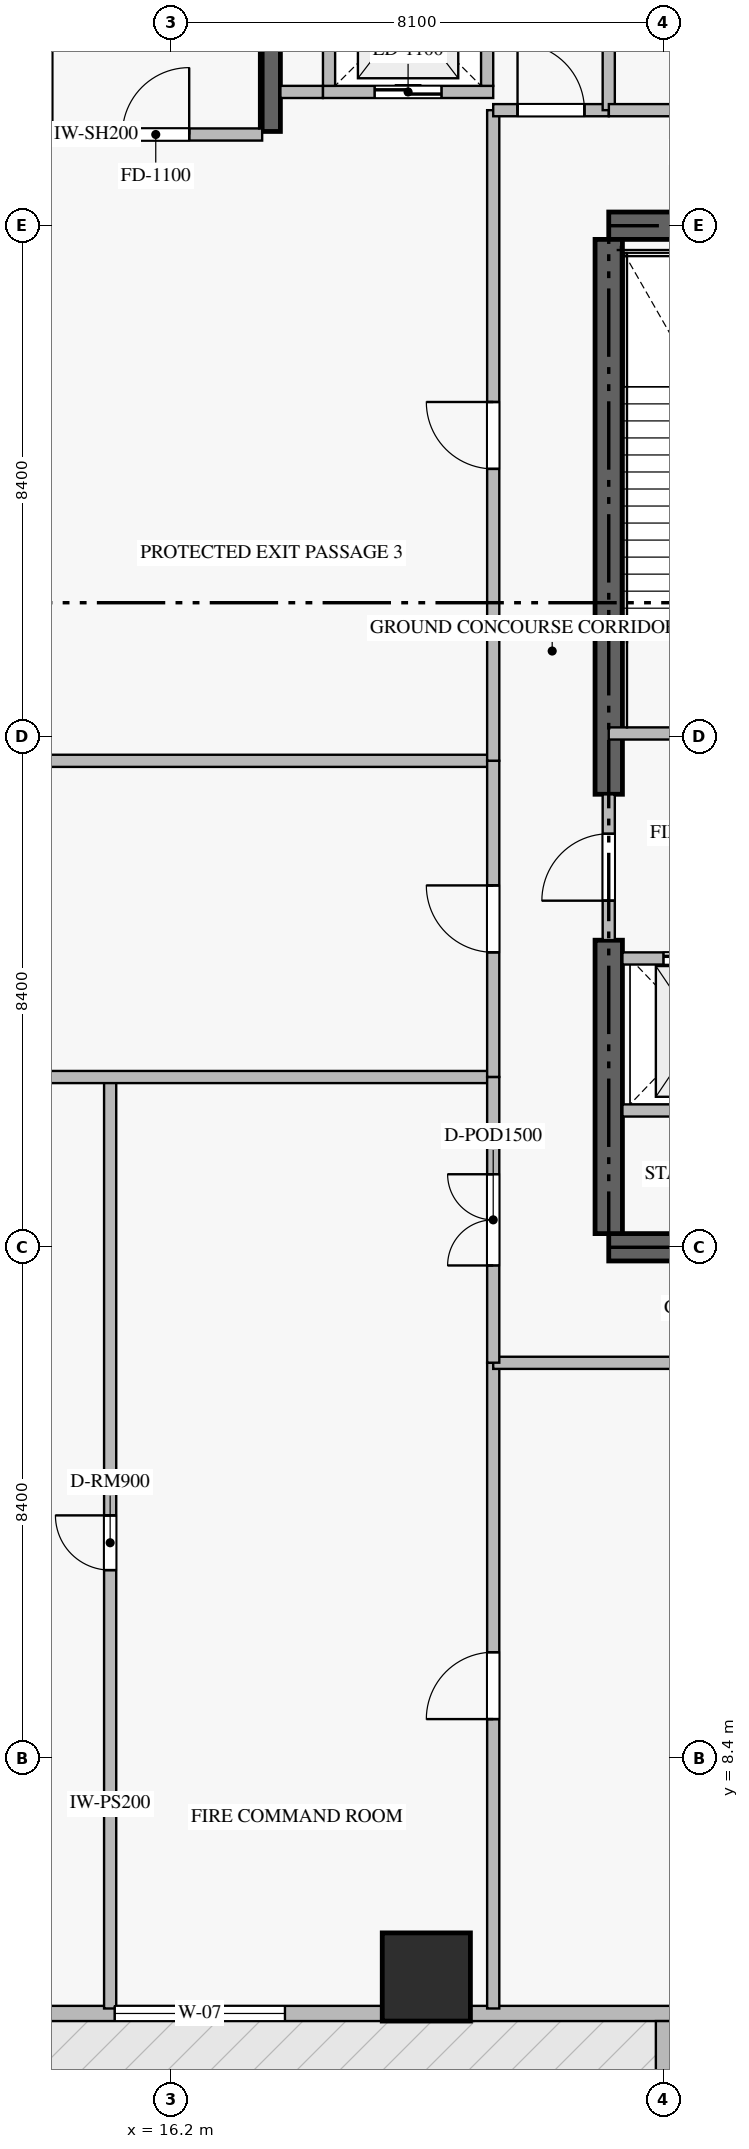
"""IFC4 building model, lengths in metres.
Left out: names, types, materials, properties, quantities, classifications, styles, units other than length and angle.
Written with IfcOpenShell. Run it as: python <this file> out.ifc"""

import sys

from ifc_helpers import new_model, si_unit, direction, frame, frame_2d, origin, origin_2d, place, context, subcontext, project, spatial, rectangle, extrude, source, transform, mapped, element, fill, save


model = new_model("IFC4")
c1 = context("Model", 3, precision=1e-05, world=origin(), true_north=direction((0.0, 1.0)))
c2 = subcontext(c1, "Body", "Model", "MODEL_VIEW")
j1 = project(units=[si_unit("LENGTHUNIT", "METRE"), si_unit("PLANEANGLEUNIT", "RADIAN")], contexts=[c1])
p1 = place(None, origin())
s1 = spatial("IfcSite", under=j1, at=p1, CompositionType="ELEMENT")
p2 = place(p1, origin())
s2 = spatial("IfcBuilding", under=s1, at=p2, CompositionType="ELEMENT")
p3 = place(p2, origin())
s3 = spatial("IfcBuildingStorey", under=s2, at=p3, CompositionType="ELEMENT", Elevation=0.0)
for number, where, z_axis, x_axis in (
    (1, (23.4, 16.8, -0.38), (0.0, 0.0, 1.0), (1.0, 0.0, 0.0)),
    (2, (41.4, 33.6, -0.38), (0.0, 0.0, 1.0), (-1.0, 0.0, 0.0)),
):
    element("IfcWall", number, at=place(p3, frame(where, z_axis=z_axis, x_axis=x_axis)), inside=s3, PredefinedType="SHEAR", context=c2, shape_type="SweptSolid", body=[
        extrude(rectangle(XDim=18.0, YDim=0.45, at=frame_2d((9.0, 0.0))), origin(), (0.0, 0.0, 1.0), 5.498),
    ])
p4 = place(p3, frame((23.4, 17.025, -0.38), z_axis=(0.0, 0.0, 1.0), x_axis=(0.0, 1.0, 0.0)))
e3 = element("IfcWall", 3, at=p4, inside=s3, PredefinedType="SHEAR", context=c2, shape_type="SweptSolid", body=[
    extrude(rectangle(XDim=4.825, YDim=0.45, at=frame_2d((2.413, 0.0))), origin(), (0.0, 0.0, 1.0), 5.498),
])
p5 = place(p3, frame((23.4, 24.25, -0.38), z_axis=(0.0, 0.0, 1.0), x_axis=(0.0, 1.0, 0.0)))
e4 = element("IfcWall", 4, at=p5, inside=s3, PredefinedType="SHEAR", context=c2, shape_type="SweptSolid", body=[
    extrude(rectangle(XDim=9.125, YDim=0.45, at=frame_2d((4.562, 0.0))), origin(), (0.0, 0.0, 1.0), 5.498),
])
m1 = source(origin(), c2, "Body", "SweptSolid", [
    extrude(rectangle(XDim=1.45, YDim=1.45, at=origin_2d()), origin(), (0.0, 0.0, 1.0), 5.5),
])
p6 = place(p3, frame((20.4, 4.8, -0.38), z_axis=(0.0, 0.0, 1.0), x_axis=(1.0, 0.0, 0.0)))
e5 = element("IfcColumn", 5, at=p6, inside=s3, PredefinedType="COLUMN", context=c2, shape_type="MappedRepresentation", body=[
    mapped(m1, transform((0.0, 0.0, 0.0), scale=1.0)),
])
p7 = place(p3, frame((-0.125, 4.2, 0.0), z_axis=(0.0, 0.0, 1.0), x_axis=(1.0, 0.0, 0.0)))
e6 = element("IfcWall", 6, at=p7, inside=s3, PredefinedType="ELEMENTEDWALL", context=c2, shape_type="SweptSolid", body=[
    extrude(rectangle(XDim=24.55, YDim=0.25, at=frame_2d((12.275, 0.0))), origin(), (0.0, 0.0, 1.0), 5.105),
])
p8 = place(p7, frame((7.4, 0.0, 0.0)))
e7 = element("IfcOpeningElement", 7, at=p8, cuts=e6, PredefinedType="OPENING", context=c2, shape_type="SweptSolid", body=[
    extrude(rectangle(XDim=1.6, YDim=2.4, at=frame_2d((0.8, 1.2))), frame((0.0, 0.135, 0.0), z_axis=(0.0, -1.0, 0.0), x_axis=(1.0, 0.0, 0.0)), (0.0, 0.0, 1.0), 0.27),
])
p9 = place(p7, frame((15.4, 0.0, 0.4)))
e8 = element("IfcOpeningElement", 8, at=p9, cuts=e6, PredefinedType="OPENING", context=c2, shape_type="SweptSolid", body=[
    extrude(rectangle(XDim=2.8, YDim=3.0, at=frame_2d((1.4, 1.5))), frame((0.0, 0.135, 0.0), z_axis=(0.0, -1.0, 0.0), x_axis=(1.0, 0.0, 0.0)), (0.0, 0.0, 1.0), 0.27),
])
p10 = place(p3, frame((24.3, 4.075, 0.0), z_axis=(0.0, 0.0, 1.0), x_axis=(0.0, -1.0, 0.0)))
e9 = element("IfcWall", 9, at=p10, inside=s3, PredefinedType="ELEMENTEDWALL", context=c2, shape_type="SweptSolid", body=[
    extrude(rectangle(XDim=1.55, YDim=0.25, at=frame_2d((0.775, 0.0))), origin(), (0.0, 0.0, 1.0), 5.105),
])
p11 = place(p3, frame((23.4, 25.25, 0.0), z_axis=(0.0, 0.0, 1.0), x_axis=(1.0, 0.0, 0.0)))
e10 = element("IfcWall", 10, at=p11, inside=s3, PredefinedType="STANDARD", context=c2, shape_type="SweptSolid", body=[
    extrude(rectangle(XDim=4.45, YDim=0.2, at=frame_2d((2.225, 0.0))), origin(), (0.0, 0.0, 1.0), 5.12),
])
p12 = place(p11, frame((1.65, 0.0, 0.0)))
e11 = element("IfcOpeningElement", 11, at=p12, cuts=e10, PredefinedType="OPENING", context=c2, shape_type="SweptSolid", body=[
    extrude(rectangle(XDim=1.1, YDim=2.15, at=frame_2d((0.55, 1.075))), frame((0.0, 0.11, 0.0), z_axis=(0.0, -1.0, 0.0), x_axis=(1.0, 0.0, 0.0)), (0.0, 0.0, 1.0), 0.22),
])
p13 = place(p3, frame((17.85, 35.15, -0.38), z_axis=(0.0, 0.0, 1.0), x_axis=(0.0, 1.0, 0.0)))
e12 = element("IfcWall", 12, at=p13, inside=s3, PredefinedType="SHEAR", context=c2, shape_type="SweptSolid", body=[
    extrude(rectangle(XDim=7.9, YDim=0.3, at=frame_2d((3.95, 0.0))), origin(), (0.0, 0.0, 1.0), 5.498),
])
p14 = place(p3, frame((14.2, 35.1, 0.0), z_axis=(0.0, 0.0, 1.0), x_axis=(1.0, 0.0, 0.0)))
e13 = element("IfcWall", 13, at=p14, inside=s3, PredefinedType="STANDARD", context=c2, shape_type="SweptSolid", body=[
    extrude(rectangle(XDim=3.5, YDim=0.2, at=frame_2d((1.75, 0.0))), origin(), (0.0, 0.0, 1.0), 5.12),
])
p15 = place(p14, frame((1.2, 0.0, 0.0)))
e14 = element("IfcOpeningElement", 14, at=p15, cuts=e13, PredefinedType="OPENING", context=c2, shape_type="SweptSolid", body=[
    extrude(rectangle(XDim=1.1, YDim=2.15, at=frame_2d((0.55, 1.075))), frame((0.0, 0.11, 0.0), z_axis=(0.0, -1.0, 0.0), x_axis=(1.0, 0.0, 0.0)), (0.0, 0.0, 1.0), 0.22),
])
p16 = place(p3, frame((23.625, 21.55, 0.0), z_axis=(0.0, 0.0, 1.0), x_axis=(1.0, 0.0, 0.0)))
e15 = element("IfcWall", 15, at=p16, inside=s3, PredefinedType="STANDARD", context=c2, shape_type="SweptSolid", body=[
    extrude(rectangle(XDim=2.425, YDim=0.2, at=frame_2d((1.212, 0.0))), origin(), (0.0, 0.0, 1.0), 5.12),
])
p17 = place(p16, frame((0.675, 0.0, 0.0)))
e16 = element("IfcOpeningElement", 16, at=p17, cuts=e15, PredefinedType="OPENING", context=c2, shape_type="SweptSolid", body=[
    extrude(rectangle(XDim=1.2, YDim=2.2, at=frame_2d((0.6, 1.1))), frame((0.0, 0.11, 0.0), z_axis=(0.0, -1.0, 0.0), x_axis=(1.0, 0.0, 0.0)), (0.0, 0.0, 1.0), 0.22),
])
p18 = place(p3, frame((18.7, 35.8, 0.0), z_axis=(0.0, 0.0, 1.0), x_axis=(1.0, 0.0, 0.0)))
e17 = element("IfcWall", 17, at=p18, inside=s3, PredefinedType="STANDARD", context=c2, shape_type="SweptSolid", body=[
    extrude(rectangle(XDim=2.8, YDim=0.2, at=frame_2d((1.4, 0.0))), origin(), (0.0, 0.0, 1.0), 5.12),
])
p19 = place(p18, frame((0.85, 0.0, 0.0)))
e18 = element("IfcOpeningElement", 18, at=p19, cuts=e17, PredefinedType="OPENING", context=c2, shape_type="SweptSolid", body=[
    extrude(rectangle(XDim=1.1, YDim=2.2, at=frame_2d((0.55, 1.1))), frame((0.0, 0.11, 0.0), z_axis=(0.0, -1.0, 0.0), x_axis=(1.0, 0.0, 0.0)), (0.0, 0.0, 1.0), 0.22),
])
for number, where, z_axis, x_axis in (
    (19, (18.8, 35.9, 0.0), (0.0, 0.0, 1.0), (0.0, 1.0, 0.0)),
    (20, (21.4, 35.9, 0.0), (0.0, 0.0, 1.0), (0.0, 1.0, 0.0)),
):
    element("IfcWall", number, at=place(p3, frame(where, z_axis=z_axis, x_axis=x_axis)), inside=s3, PredefinedType="STANDARD", context=c2, shape_type="SweptSolid", body=[
        extrude(rectangle(XDim=2.4, YDim=0.2, at=frame_2d((1.2, 0.0))), origin(), (0.0, 0.0, 1.0), 5.12),
    ])
p20 = place(p3, frame((23.625, 19.05, 0.0), z_axis=(0.0, 0.0, 1.0), x_axis=(1.0, 0.0, 0.0)))
e21 = element("IfcWall", 21, at=p20, inside=s3, PredefinedType="STANDARD", context=c2, shape_type="SweptSolid", body=[
    extrude(rectangle(XDim=2.425, YDim=0.2, at=frame_2d((1.212, 0.0))), origin(), (0.0, 0.0, 1.0), 5.12),
])
p21 = place(p3, frame((23.4, 21.852, 0.0), z_axis=(0.0, 0.0, 1.0), x_axis=(0.0, 1.0, 0.0)))
e22 = element("IfcWall", 22, at=p21, inside=s3, PredefinedType="STANDARD", context=c2, shape_type="SweptSolid", body=[
    extrude(rectangle(XDim=2.396, YDim=0.2, at=frame_2d((1.198, 0.0))), origin(), (0.0, 0.0, 1.0), 5.12),
])
p22 = place(p21, frame((0.648, 0.0, 0.0)))
e23 = element("IfcOpeningElement", 23, at=p22, cuts=e22, PredefinedType="OPENING", context=c2, shape_type="SweptSolid", body=[
    extrude(rectangle(XDim=1.1, YDim=2.15, at=frame_2d((0.55, 1.075))), frame((0.0, 0.11, 0.0), z_axis=(0.0, -1.0, 0.0), x_axis=(1.0, 0.0, 0.0)), (0.0, 0.0, 1.0), 0.22),
])
p23 = place(p3, frame((15.2, 4.282, 0.0), z_axis=(0.0, 0.0, 1.0), x_axis=(0.0, 1.0, 0.0)))
e24 = element("IfcWall", 24, at=p23, inside=s3, PredefinedType="STANDARD", context=c2, shape_type="SweptSolid", body=[
    extrude(rectangle(XDim=15.318, YDim=0.2, at=frame_2d((7.659, 0.0))), origin(), (0.0, 0.0, 1.0), 5.12),
])
p24 = place(p23, frame((7.209, 0.0, 0.0)))
e25 = element("IfcOpeningElement", 25, at=p24, cuts=e24, PredefinedType="OPENING", context=c2, shape_type="SweptSolid", body=[
    extrude(rectangle(XDim=0.9, YDim=2.1, at=frame_2d((0.45, 1.05))), frame((0.0, 0.11, 0.0), z_axis=(0.0, -1.0, 0.0), x_axis=(1.0, 0.0, 0.0)), (0.0, 0.0, 1.0), 0.22),
])
p25 = place(p3, frame((21.5, 4.282, 0.0), z_axis=(0.0, 0.0, 1.0), x_axis=(0.0, 1.0, 0.0)))
e26 = element("IfcWall", 26, at=p25, inside=s3, PredefinedType="STANDARD", context=c2, shape_type="SweptSolid", body=[
    extrude(rectangle(XDim=10.618, YDim=0.2, at=frame_2d((5.309, 0.0))), origin(), (0.0, 0.0, 1.0), 5.12),
])
p26 = place(p25, frame((4.759, 0.0, 0.0)))
e27 = element("IfcOpeningElement", 27, at=p26, cuts=e26, PredefinedType="OPENING", context=c2, shape_type="SweptSolid", body=[
    extrude(rectangle(XDim=1.1, YDim=2.15, at=frame_2d((0.55, 1.075))), frame((0.0, 0.11, 0.0), z_axis=(0.0, -1.0, 0.0), x_axis=(1.0, 0.0, 0.0)), (0.0, 0.0, 1.0), 0.22),
])
p27 = place(p3, frame((0.082, 19.6, 0.0), z_axis=(0.0, 0.0, 1.0), x_axis=(1.0, 0.0, 0.0)))
e28 = element("IfcWall", 28, at=p27, inside=s3, PredefinedType="STANDARD", context=c2, shape_type="SweptSolid", body=[
    extrude(rectangle(XDim=21.418, YDim=0.2, at=frame_2d((10.709, 0.0))), origin(), (0.0, 0.0, 1.0), 5.12),
])
p28 = place(p3, frame((5.08, 24.8, 0.0), z_axis=(0.0, 0.0, 1.0), x_axis=(1.0, 0.0, 0.0)))
e29 = element("IfcWall", 29, at=p28, inside=s3, PredefinedType="STANDARD", context=c2, shape_type="SweptSolid", body=[
    extrude(rectangle(XDim=16.42, YDim=0.2, at=frame_2d((8.21, 0.0))), origin(), (0.0, 0.0, 1.0), 5.12),
])
p29 = place(p3, frame((21.5, 14.9, 0.0), z_axis=(0.0, 0.0, 1.0), x_axis=(1.0, 0.0, 0.0)))
e30 = element("IfcWall", 30, at=p29, inside=s3, PredefinedType="STANDARD", context=c2, shape_type="SweptSolid", body=[
    extrude(rectangle(XDim=21.8, YDim=0.2, at=frame_2d((10.9, 0.0))), origin(), (0.0, 0.0, 1.0), 5.12),
])
p30 = place(p29, frame((10.1, 0.0, 0.0)))
e31 = element("IfcOpeningElement", 31, at=p30, cuts=e30, PredefinedType="OPENING", context=c2, shape_type="SweptSolid", body=[
    extrude(rectangle(XDim=1.6, YDim=2.3, at=frame_2d((0.8, 1.15))), frame((0.0, 0.11, 0.0), z_axis=(0.0, -1.0, 0.0), x_axis=(1.0, 0.0, 0.0)), (0.0, 0.0, 1.0), 0.22),
])
p31 = place(p3, frame((21.5, 14.902, 0.0), z_axis=(0.0, 0.0, 1.0), x_axis=(0.0, 1.0, 0.0)))
e32 = element("IfcWall", 32, at=p31, inside=s3, PredefinedType="STANDARD", context=c2, shape_type="SweptSolid", body=[
    extrude(rectangle(XDim=4.698, YDim=0.2, at=frame_2d((2.349, 0.0))), origin(), (0.0, 0.0, 1.0), 5.12),
])
p32 = place(p31, frame((1.599, 0.0, 0.0)))
e33 = element("IfcOpeningElement", 33, at=p32, cuts=e32, PredefinedType="OPENING", context=c2, shape_type="SweptSolid", body=[
    extrude(rectangle(XDim=1.5, YDim=2.25, at=frame_2d((0.75, 1.125))), frame((0.0, 0.11, 0.0), z_axis=(0.0, -1.0, 0.0), x_axis=(1.0, 0.0, 0.0)), (0.0, 0.0, 1.0), 0.22),
])
p33 = place(p3, frame((21.5, 19.602, 0.0), z_axis=(0.0, 0.0, 1.0), x_axis=(0.0, 1.0, 0.0)))
e34 = element("IfcWall", 34, at=p33, inside=s3, PredefinedType="STANDARD", context=c2, shape_type="SweptSolid", body=[
    extrude(rectangle(XDim=5.198, YDim=0.2, at=frame_2d((2.599, 0.0))), origin(), (0.0, 0.0, 1.0), 5.12),
])
p34 = place(p33, frame((2.049, 0.0, 0.0)))
e35 = element("IfcOpeningElement", 35, at=p34, cuts=e34, PredefinedType="OPENING", context=c2, shape_type="SweptSolid", body=[
    extrude(rectangle(XDim=1.1, YDim=2.15, at=frame_2d((0.55, 1.075))), frame((0.0, 0.11, 0.0), z_axis=(0.0, -1.0, 0.0), x_axis=(1.0, 0.0, 0.0)), (0.0, 0.0, 1.0), 0.22),
])
p35 = place(p3, frame((21.5, 24.802, 0.0), z_axis=(0.0, 0.0, 1.0), x_axis=(0.0, 1.0, 0.0)))
e36 = element("IfcWall", 36, at=p35, inside=s3, PredefinedType="STANDARD", context=c2, shape_type="SweptSolid", body=[
    extrude(rectangle(XDim=10.698, YDim=0.2, at=frame_2d((5.349, 0.0))), origin(), (0.0, 0.0, 1.0), 5.12),
])
p36 = place(p35, frame((4.799, 0.0, 0.0)))
e37 = element("IfcOpeningElement", 37, at=p36, cuts=e36, PredefinedType="OPENING", context=c2, shape_type="SweptSolid", body=[
    extrude(rectangle(XDim=1.1, YDim=2.15, at=frame_2d((0.55, 1.075))), frame((0.0, 0.11, 0.0), z_axis=(0.0, -1.0, 0.0), x_axis=(1.0, 0.0, 0.0)), (0.0, 0.0, 1.0), 0.22),
])
p37 = place(p3, frame((21.5, 35.5, 0.0), z_axis=(0.0, 0.0, 1.0), x_axis=(1.0, 0.0, 0.0)))
e38 = element("IfcWall", 38, at=p37, inside=s3, PredefinedType="STANDARD", context=c2, shape_type="SweptSolid", body=[
    extrude(rectangle(XDim=1.9, YDim=0.2, at=frame_2d((0.95, 0.0))), origin(), (0.0, 0.0, 1.0), 5.12),
])
p38 = place(p37, frame((0.4, 0.0, 0.0)))
e39 = element("IfcOpeningElement", 39, at=p38, cuts=e38, PredefinedType="OPENING", context=c2, shape_type="SweptSolid", body=[
    extrude(rectangle(XDim=1.1, YDim=2.15, at=frame_2d((0.55, 1.075))), frame((0.0, 0.11, 0.0), z_axis=(0.0, -1.0, 0.0), x_axis=(1.0, 0.0, 0.0)), (0.0, 0.0, 1.0), 0.22),
])
p39 = place(p3, frame((23.4, 35.5, 0.0), z_axis=(0.0, 0.0, 1.0), x_axis=(0.0, 1.0, 0.0)))
e40 = element("IfcWall", 40, at=p39, inside=s3, PredefinedType="STANDARD", context=c2, shape_type="SweptSolid", body=[
    extrude(rectangle(XDim=10.7, YDim=0.2, at=frame_2d((5.35, 0.0))), origin(), (0.0, 0.0, 1.0), 5.12),
])
p40 = place(p3, frame((18.0, 35.8, 0.0), z_axis=(0.0, 0.0, 1.0), x_axis=(1.0, 0.0, 0.0)))
e41 = element("IfcWall", 41, at=p40, inside=s3, PredefinedType="STANDARD", context=c2, shape_type="SweptSolid", body=[
    extrude(rectangle(XDim=0.698, YDim=0.2, at=frame_2d((0.349, 0.0))), origin(), (0.0, 0.0, 1.0), 5.12),
])
p41 = place(p3, frame((23.402, 35.5, 0.0), z_axis=(0.0, 0.0, 1.0), x_axis=(1.0, 0.0, 0.0)))
e42 = element("IfcWall", 42, at=p41, inside=s3, PredefinedType="STANDARD", context=c2, shape_type="SweptSolid", body=[
    extrude(rectangle(XDim=3.598, YDim=0.2, at=frame_2d((1.799, 0.0))), origin(), (0.0, 0.0, 1.0), 5.12),
])
p42 = place(p41, frame((1.299, 0.0, 0.0)))
e43 = element("IfcOpeningElement", 43, at=p42, cuts=e42, PredefinedType="OPENING", context=c2, shape_type="SweptSolid", body=[
    extrude(rectangle(XDim=1.0, YDim=2.15, at=frame_2d((0.5, 1.075))), frame((0.0, 0.11, 0.0), z_axis=(0.0, -1.0, 0.0), x_axis=(1.0, 0.0, 0.0)), (0.0, 0.0, 1.0), 0.22),
])
m2 = source(origin(), c2, "Body", "SweptSolid", [
    extrude(rectangle(XDim=2.8, YDim=3.0, at=frame_2d((1.4, 1.5))), frame((0.0, 0.03, 0.0), z_axis=(0.0, -1.0, 0.0), x_axis=(1.0, 0.0, 0.0)), (0.0, 0.0, 1.0), 0.06),
])
p43 = place(p9, origin())
e44 = element("IfcWindow", 44, at=p43, inside=s3, PartitioningType="SINGLE_PANEL", PredefinedType="WINDOW", context=c2, shape_type="MappedRepresentation", body=[
    mapped(m2, transform((0.0, 0.0, 0.0), scale=1.0)),
])
fill(e8, e44)
m3 = source(origin(), c2, "Body", "SweptSolid", [
    extrude(rectangle(XDim=1.1, YDim=2.15, at=frame_2d((0.55, 1.075))), frame((0.0, 0.025, 0.0), z_axis=(0.0, -1.0, 0.0), x_axis=(1.0, 0.0, 0.0)), (0.0, 0.0, 1.0), 0.05),
])
p44 = place(p15, origin())
e45 = element("IfcDoor", 45, at=p44, inside=s3, OperationType="SINGLE_SWING_RIGHT", PredefinedType="DOOR", context=c2, shape_type="MappedRepresentation", body=[
    mapped(m3, transform((0.0, 0.0, 0.0), scale=1.0)),
])
fill(e14, e45)
m4 = source(origin(), c2, "Body", "SweptSolid", [
    extrude(rectangle(XDim=1.2, YDim=2.2, at=frame_2d((0.6, 1.1))), frame((0.0, 0.025, 0.0), z_axis=(0.0, -1.0, 0.0), x_axis=(1.0, 0.0, 0.0)), (0.0, 0.0, 1.0), 0.05),
])
p45 = place(p17, origin())
e46 = element("IfcDoor", 46, at=p45, inside=s3, OperationType="DOUBLE_DOOR_SLIDING", PredefinedType="DOOR", context=c2, shape_type="MappedRepresentation", body=[
    mapped(m4, transform((0.0, 0.0, 0.0), scale=1.0)),
])
fill(e16, e46)
m5 = source(origin(), c2, "Body", "SweptSolid", [
    extrude(rectangle(XDim=1.1, YDim=2.2, at=frame_2d((0.55, 1.1))), frame((0.0, 0.025, 0.0), z_axis=(0.0, -1.0, 0.0), x_axis=(1.0, 0.0, 0.0)), (0.0, 0.0, 1.0), 0.05),
])
p46 = place(p19, origin())
e47 = element("IfcDoor", 47, at=p46, inside=s3, OperationType="DOUBLE_DOOR_SLIDING", PredefinedType="DOOR", context=c2, shape_type="MappedRepresentation", body=[
    mapped(m5, transform((0.0, 0.0, 0.0), scale=1.0)),
])
fill(e18, e47)
p47 = place(p22, origin())
e48 = element("IfcDoor", 48, at=p47, inside=s3, OperationType="SINGLE_SWING_LEFT", PredefinedType="DOOR", context=c2, shape_type="MappedRepresentation", body=[
    mapped(m3, transform((0.0, 0.0, 0.0), scale=1.0)),
])
fill(e23, e48)
m6 = source(origin(), c2, "Body", "SweptSolid", [
    extrude(rectangle(XDim=0.9, YDim=2.1, at=frame_2d((0.45, 1.05))), frame((0.0, 0.025, 0.0), z_axis=(0.0, -1.0, 0.0), x_axis=(1.0, 0.0, 0.0)), (0.0, 0.0, 1.0), 0.05),
])
p48 = place(p24, origin())
e49 = element("IfcDoor", 49, at=p48, inside=s3, OperationType="SINGLE_SWING_RIGHT", PredefinedType="DOOR", context=c2, shape_type="MappedRepresentation", body=[
    mapped(m6, transform((0.0, 0.0, 0.0), scale=1.0)),
])
fill(e25, e49)
p49 = place(p26, origin())
e50 = element("IfcDoor", 50, at=p49, inside=s3, OperationType="SINGLE_SWING_LEFT", PredefinedType="DOOR", context=c2, shape_type="MappedRepresentation", body=[
    mapped(m3, transform((0.0, 0.0, 0.0), scale=1.0)),
])
fill(e27, e50)
m7 = source(origin(), c2, "Body", "SweptSolid", [
    extrude(rectangle(XDim=1.5, YDim=2.25, at=frame_2d((0.75, 1.125))), frame((0.0, 0.025, 0.0), z_axis=(0.0, -1.0, 0.0), x_axis=(1.0, 0.0, 0.0)), (0.0, 0.0, 1.0), 0.05),
])
p50 = place(p32, origin())
e51 = element("IfcDoor", 51, at=p50, inside=s3, OperationType="DOUBLE_DOOR_SINGLE_SWING", PredefinedType="DOOR", context=c2, shape_type="MappedRepresentation", body=[
    mapped(m7, transform((0.0, 0.0, 0.0), scale=1.0)),
])
fill(e33, e51)
p51 = place(p34, origin())
e52 = element("IfcDoor", 52, at=p51, inside=s3, OperationType="SINGLE_SWING_RIGHT", PredefinedType="DOOR", context=c2, shape_type="MappedRepresentation", body=[
    mapped(m3, transform((0.0, 0.0, 0.0), scale=1.0)),
])
fill(e35, e52)
p52 = place(p36, origin())
e53 = element("IfcDoor", 53, at=p52, inside=s3, OperationType="SINGLE_SWING_RIGHT", PredefinedType="DOOR", context=c2, shape_type="MappedRepresentation", body=[
    mapped(m3, transform((0.0, 0.0, 0.0), scale=1.0)),
])
fill(e37, e53)
p53 = place(p38, origin())
e54 = element("IfcDoor", 54, at=p53, inside=s3, OperationType="SINGLE_SWING_LEFT", PredefinedType="DOOR", context=c2, shape_type="MappedRepresentation", body=[
    mapped(m3, transform((0.0, 0.0, 0.0), scale=1.0)),
])
fill(e39, e54)
save(model, sys.argv[1])
